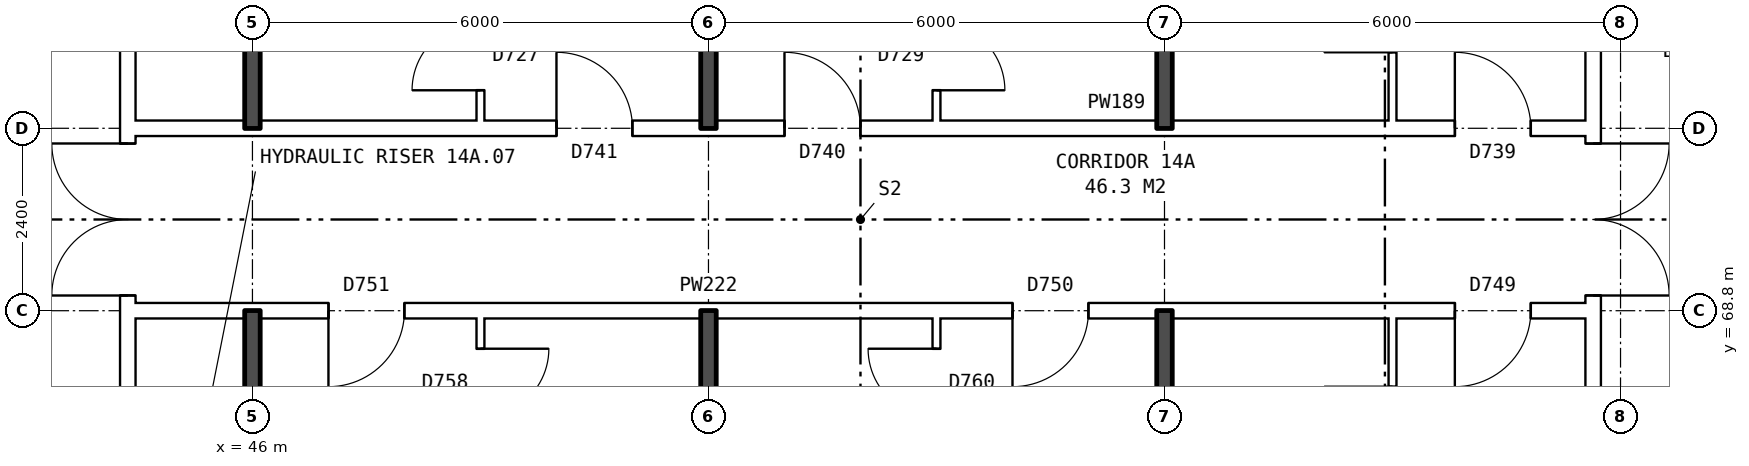
"""IFC4 building model, lengths in metres.
Left out: names, types, materials, properties, quantities, classifications, styles, units other than length and angle.
Written with IfcOpenShell. Run it as: python <this file> out.ifc"""

import sys

from ifc_helpers import new_model, si_unit, direction, frame, frame_2d, origin, place, context, subcontext, project, spatial, rectangle, extrude, element, fill, save


model = new_model("IFC4")
c1 = context("Model", 3, precision=1e-05, world=origin(), true_north=direction((0.0, 1.0)))
c2 = subcontext(c1, "Body", "Model", "MODEL_VIEW")
j1 = project(units=[si_unit("LENGTHUNIT", "METRE"), si_unit("PLANEANGLEUNIT", "RADIAN")], contexts=[c1])
p1 = place(None, origin())
s1 = spatial("IfcSite", under=j1, at=p1, CompositionType="ELEMENT")
p2 = place(p1, origin())
s2 = spatial("IfcBuilding", under=s1, at=p2, CompositionType="ELEMENT")
p3 = place(p2, frame((0.0, 0.0, 53.6)))
s3 = spatial("IfcBuildingStorey", under=s2, at=p3, CompositionType="ELEMENT", Elevation=53.6)
p4 = place(p3, frame((63.64, 63.9, 0.0), z_axis=(0.0, 0.0, 1.0), x_axis=(0.0, 1.0, 0.0)))
e1 = element("IfcWall", 1, at=p4, inside=s3, PredefinedType="PARTITIONING", context=c2, shape_type="SweptSolid", body=[
    extrude(rectangle(XDim=12.2, YDim=0.2, at=frame_2d((6.1, 0.0))), origin(), (0.0, 0.0, 1.0), 2.85),
])
p5 = place(p4, frame((5.1, 0.0, 0.0)))
e2 = element("IfcOpeningElement", 2, at=p5, cuts=e1, PredefinedType="OPENING", context=c2, shape_type="SweptSolid", body=[
    extrude(rectangle(XDim=2.0, YDim=2.1, at=frame_2d((1.0, 1.05))), frame((0.0, 0.11, 0.0), z_axis=(0.0, -1.0, 0.0), x_axis=(1.0, 0.0, 0.0)), (0.0, 0.0, 1.0), 0.22),
])
p6 = place(p3, frame((44.36, 63.9, 0.0), z_axis=(0.0, 0.0, 1.0), x_axis=(0.0, 1.0, 0.0)))
e3 = element("IfcWall", 3, at=p6, inside=s3, PredefinedType="PARTITIONING", context=c2, shape_type="SweptSolid", body=[
    extrude(rectangle(XDim=12.2, YDim=0.2, at=frame_2d((6.1, 0.0))), origin(), (0.0, 0.0, 1.0), 2.85),
])
p7 = place(p6, frame((5.1, 0.0, 0.0)))
e4 = element("IfcOpeningElement", 4, at=p7, cuts=e3, PredefinedType="OPENING", context=c2, shape_type="SweptSolid", body=[
    extrude(rectangle(XDim=2.0, YDim=2.1, at=frame_2d((1.0, 1.05))), frame((0.0, 0.11, 0.0), z_axis=(0.0, -1.0, 0.0), x_axis=(1.0, 0.0, 0.0)), (0.0, 0.0, 1.0), 0.22),
])
p8 = place(p3, frame((44.36, 68.8, 0.0), z_axis=(0.0, 0.0, 1.0), x_axis=(1.0, 0.0, 0.0)))
e5 = element("IfcWall", 5, at=p8, inside=s3, PredefinedType="PARTITIONING", context=c2, shape_type="SweptSolid", body=[
    extrude(rectangle(XDim=19.28, YDim=0.2, at=frame_2d((9.64, 0.0))), origin(), (0.0, 0.0, 1.0), 2.85),
])
p9 = place(p8, frame((17.46, 0.0, 0.0)))
e6 = element("IfcOpeningElement", 6, at=p9, cuts=e5, PredefinedType="OPENING", context=c2, shape_type="SweptSolid", body=[
    extrude(rectangle(XDim=1.0, YDim=2.1, at=frame_2d((0.5, 1.05))), frame((0.0, 0.11, 0.0), z_axis=(0.0, -1.0, 0.0), x_axis=(1.0, 0.0, 0.0)), (0.0, 0.0, 1.0), 0.22),
])
p10 = place(p8, frame((11.64, 0.0, 0.0)))
e7 = element("IfcOpeningElement", 7, at=p10, cuts=e5, PredefinedType="OPENING", context=c2, shape_type="SweptSolid", body=[
    extrude(rectangle(XDim=1.0, YDim=2.1, at=frame_2d((0.5, 1.05))), frame((0.0, 0.11, 0.0), z_axis=(0.0, -1.0, 0.0), x_axis=(1.0, 0.0, 0.0)), (0.0, 0.0, 1.0), 0.22),
])
p11 = place(p8, frame((2.64, 0.0, 0.0)))
e8 = element("IfcOpeningElement", 8, at=p11, cuts=e5, PredefinedType="OPENING", context=c2, shape_type="SweptSolid", body=[
    extrude(rectangle(XDim=1.0, YDim=2.1, at=frame_2d((0.5, 1.05))), frame((0.0, 0.11, 0.0), z_axis=(0.0, -1.0, 0.0), x_axis=(1.0, 0.0, 0.0)), (0.0, 0.0, 1.0), 0.22),
])
p12 = place(p3, frame((44.36, 71.2, 0.0), z_axis=(0.0, 0.0, 1.0), x_axis=(1.0, 0.0, 0.0)))
e9 = element("IfcWall", 9, at=p12, inside=s3, PredefinedType="PARTITIONING", context=c2, shape_type="SweptSolid", body=[
    extrude(rectangle(XDim=19.28, YDim=0.2, at=frame_2d((9.64, 0.0))), origin(), (0.0, 0.0, 1.0), 2.85),
])
p13 = place(p12, frame((17.46, 0.0, 0.0)))
e10 = element("IfcOpeningElement", 10, at=p13, cuts=e9, PredefinedType="OPENING", context=c2, shape_type="SweptSolid", body=[
    extrude(rectangle(XDim=1.0, YDim=2.1, at=frame_2d((0.5, 1.05))), frame((0.0, 0.11, 0.0), z_axis=(0.0, -1.0, 0.0), x_axis=(1.0, 0.0, 0.0)), (0.0, 0.0, 1.0), 0.22),
])
p14 = place(p12, frame((8.64, 0.0, 0.0)))
e11 = element("IfcOpeningElement", 11, at=p14, cuts=e9, PredefinedType="OPENING", context=c2, shape_type="SweptSolid", body=[
    extrude(rectangle(XDim=1.0, YDim=2.1, at=frame_2d((0.5, 1.05))), frame((0.0, 0.11, 0.0), z_axis=(0.0, -1.0, 0.0), x_axis=(1.0, 0.0, 0.0)), (0.0, 0.0, 1.0), 0.22),
])
p15 = place(p12, frame((5.64, 0.0, 0.0)))
e12 = element("IfcOpeningElement", 12, at=p15, cuts=e9, PredefinedType="OPENING", context=c2, shape_type="SweptSolid", body=[
    extrude(rectangle(XDim=1.0, YDim=2.1, at=frame_2d((0.5, 1.05))), frame((0.0, 0.11, 0.0), z_axis=(0.0, -1.0, 0.0), x_axis=(1.0, 0.0, 0.0)), (0.0, 0.0, 1.0), 0.22),
])
for number, where, z_axis, x_axis in (
    (13, (46.0, 63.8, 0.0), (0.0, 0.0, 1.0), (0.0, 1.0, 0.0)),
    (14, (46.0, 71.2, 0.0), (0.0, 0.0, 1.0), (0.0, 1.0, 0.0)),
):
    element("IfcWall", number, at=place(p3, frame(where, z_axis=z_axis, x_axis=x_axis)), inside=s3, PredefinedType="SOLIDWALL", context=c2, shape_type="SweptSolid", body=[
        extrude(rectangle(XDim=5.0, YDim=0.2, at=frame_2d((2.5, 0.0))), origin(), (0.0, 0.0, 1.0), 2.85),
    ])
p16 = place(p3, frame((49.0, 54.36, 0.0), z_axis=(0.0, 0.0, 1.0), x_axis=(0.0, 1.0, 0.0)))
e15 = element("IfcWall", 15, at=p16, inside=s3, PredefinedType="PARTITIONING", context=c2, shape_type="SweptSolid", body=[
    extrude(rectangle(XDim=14.34, YDim=0.1, at=frame_2d((7.17, 0.0))), origin(), (0.0, 0.0, 1.0), 2.85),
])
p17 = place(p16, frame((5.5, 0.0, 0.0)))
e16 = element("IfcOpeningElement", 16, at=p17, cuts=e15, PredefinedType="OPENING", context=c2, shape_type="SweptSolid", body=[
    extrude(rectangle(XDim=0.9, YDim=2.1, at=frame_2d((0.45, 1.05))), frame((0.0, 0.06, 0.0), z_axis=(0.0, -1.0, 0.0), x_axis=(1.0, 0.0, 0.0)), (0.0, 0.0, 1.0), 0.12),
])
p18 = place(p16, frame((13.04, 0.0, 0.0)))
e17 = element("IfcOpeningElement", 17, at=p18, cuts=e15, PredefinedType="OPENING", context=c2, shape_type="SweptSolid", body=[
    extrude(rectangle(XDim=0.9, YDim=2.1, at=frame_2d((0.45, 1.05))), frame((0.0, 0.06, 0.0), z_axis=(0.0, -1.0, 0.0), x_axis=(1.0, 0.0, 0.0)), (0.0, 0.0, 1.0), 0.12),
])
p19 = place(p3, frame((49.0, 71.3, 0.0), z_axis=(0.0, 0.0, 1.0), x_axis=(0.0, 1.0, 0.0)))
e18 = element("IfcWall", 18, at=p19, inside=s3, PredefinedType="PARTITIONING", context=c2, shape_type="SweptSolid", body=[
    extrude(rectangle(XDim=14.34, YDim=0.1, at=frame_2d((7.17, 0.0))), origin(), (0.0, 0.0, 1.0), 2.85),
])
p20 = place(p19, frame((6.74, 0.0, 0.0)))
e19 = element("IfcOpeningElement", 19, at=p20, cuts=e18, PredefinedType="OPENING", context=c2, shape_type="SweptSolid", body=[
    extrude(rectangle(XDim=0.9, YDim=2.1, at=frame_2d((0.45, 1.05))), frame((0.0, 0.06, 0.0), z_axis=(0.0, -1.0, 0.0), x_axis=(1.0, 0.0, 0.0)), (0.0, 0.0, 1.0), 0.12),
])
p21 = place(p19, frame((0.4, 0.0, 0.0)))
e20 = element("IfcOpeningElement", 20, at=p21, cuts=e18, PredefinedType="OPENING", context=c2, shape_type="SweptSolid", body=[
    extrude(rectangle(XDim=0.9, YDim=2.1, at=frame_2d((0.45, 1.05))), frame((0.0, 0.06, 0.0), z_axis=(0.0, -1.0, 0.0), x_axis=(1.0, 0.0, 0.0)), (0.0, 0.0, 1.0), 0.12),
])
for number, where, z_axis, x_axis in (
    (21, (52.0, 54.36, 0.0), (0.0, 0.0, 1.0), (0.0, 1.0, 0.0)),
    (22, (52.0, 71.2, 0.0), (0.0, 0.0, 1.0), (0.0, 1.0, 0.0)),
):
    element("IfcWall", number, at=place(p3, frame(where, z_axis=z_axis, x_axis=x_axis)), inside=s3, PredefinedType="SOLIDWALL", context=c2, shape_type="SweptSolid", body=[
        extrude(rectangle(XDim=14.44, YDim=0.2, at=frame_2d((7.22, 0.0))), origin(), (0.0, 0.0, 1.0), 2.85),
    ])
p22 = place(p3, frame((55.0, 54.36, 0.0), z_axis=(0.0, 0.0, 1.0), x_axis=(0.0, 1.0, 0.0)))
e23 = element("IfcWall", 23, at=p22, inside=s3, PredefinedType="PARTITIONING", context=c2, shape_type="SweptSolid", body=[
    extrude(rectangle(XDim=14.34, YDim=0.1, at=frame_2d((7.17, 0.0))), origin(), (0.0, 0.0, 1.0), 2.85),
])
p23 = place(p22, frame((7.7, 0.0, 0.0)))
e24 = element("IfcOpeningElement", 24, at=p23, cuts=e23, PredefinedType="OPENING", context=c2, shape_type="SweptSolid", body=[
    extrude(rectangle(XDim=0.9, YDim=2.1, at=frame_2d((0.45, 1.05))), frame((0.0, 0.06, 0.0), z_axis=(0.0, -1.0, 0.0), x_axis=(1.0, 0.0, 0.0)), (0.0, 0.0, 1.0), 0.12),
])
p24 = place(p22, frame((13.04, 0.0, 0.0)))
e25 = element("IfcOpeningElement", 25, at=p24, cuts=e23, PredefinedType="OPENING", context=c2, shape_type="SweptSolid", body=[
    extrude(rectangle(XDim=0.9, YDim=2.1, at=frame_2d((0.45, 1.05))), frame((0.0, 0.06, 0.0), z_axis=(0.0, -1.0, 0.0), x_axis=(1.0, 0.0, 0.0)), (0.0, 0.0, 1.0), 0.12),
])
p25 = place(p3, frame((55.0, 71.3, 0.0), z_axis=(0.0, 0.0, 1.0), x_axis=(0.0, 1.0, 0.0)))
e26 = element("IfcWall", 26, at=p25, inside=s3, PredefinedType="PARTITIONING", context=c2, shape_type="SweptSolid", body=[
    extrude(rectangle(XDim=14.34, YDim=0.1, at=frame_2d((7.17, 0.0))), origin(), (0.0, 0.0, 1.0), 2.85),
])
p26 = place(p25, frame((7.94, 0.0, 0.0)))
e27 = element("IfcOpeningElement", 27, at=p26, cuts=e26, PredefinedType="OPENING", context=c2, shape_type="SweptSolid", body=[
    extrude(rectangle(XDim=0.9, YDim=2.1, at=frame_2d((0.45, 1.05))), frame((0.0, 0.06, 0.0), z_axis=(0.0, -1.0, 0.0), x_axis=(1.0, 0.0, 0.0)), (0.0, 0.0, 1.0), 0.12),
])
p27 = place(p25, frame((0.4, 0.0, 0.0)))
e28 = element("IfcOpeningElement", 28, at=p27, cuts=e26, PredefinedType="OPENING", context=c2, shape_type="SweptSolid", body=[
    extrude(rectangle(XDim=0.9, YDim=2.1, at=frame_2d((0.45, 1.05))), frame((0.0, 0.06, 0.0), z_axis=(0.0, -1.0, 0.0), x_axis=(1.0, 0.0, 0.0)), (0.0, 0.0, 1.0), 0.12),
])
for number, where, z_axis, x_axis in (
    (29, (58.0, 54.36, 0.0), (0.0, 0.0, 1.0), (0.0, 1.0, 0.0)),
    (30, (58.0, 71.2, 0.0), (0.0, 0.0, 1.0), (0.0, 1.0, 0.0)),
):
    element("IfcWall", number, at=place(p3, frame(where, z_axis=z_axis, x_axis=x_axis)), inside=s3, PredefinedType="SOLIDWALL", context=c2, shape_type="SweptSolid", body=[
        extrude(rectangle(XDim=14.44, YDim=0.2, at=frame_2d((7.22, 0.0))), origin(), (0.0, 0.0, 1.0), 2.85),
    ])
p28 = place(p3, frame((61.0, 54.36, 0.0), z_axis=(0.0, 0.0, 1.0), x_axis=(0.0, 1.0, 0.0)))
e31 = element("IfcWall", 31, at=p28, inside=s3, PredefinedType="PARTITIONING", context=c2, shape_type="SweptSolid", body=[
    extrude(rectangle(XDim=14.34, YDim=0.1, at=frame_2d((7.17, 0.0))), origin(), (0.0, 0.0, 1.0), 2.85),
])
p29 = place(p28, frame((5.5, 0.0, 0.0)))
e32 = element("IfcOpeningElement", 32, at=p29, cuts=e31, PredefinedType="OPENING", context=c2, shape_type="SweptSolid", body=[
    extrude(rectangle(XDim=0.9, YDim=2.1, at=frame_2d((0.45, 1.05))), frame((0.0, 0.06, 0.0), z_axis=(0.0, -1.0, 0.0), x_axis=(1.0, 0.0, 0.0)), (0.0, 0.0, 1.0), 0.12),
])
p30 = place(p28, frame((12.54, 0.0, 0.0)))
e33 = element("IfcOpeningElement", 33, at=p30, cuts=e31, PredefinedType="OPENING", context=c2, shape_type="SweptSolid", body=[
    extrude(rectangle(XDim=0.9, YDim=2.1, at=frame_2d((0.45, 1.05))), frame((0.0, 0.06, 0.0), z_axis=(0.0, -1.0, 0.0), x_axis=(1.0, 0.0, 0.0)), (0.0, 0.0, 1.0), 0.12),
])
p31 = place(p3, frame((61.0, 71.3, 0.0), z_axis=(0.0, 0.0, 1.0), x_axis=(0.0, 1.0, 0.0)))
e34 = element("IfcWall", 34, at=p31, inside=s3, PredefinedType="PARTITIONING", context=c2, shape_type="SweptSolid", body=[
    extrude(rectangle(XDim=14.34, YDim=0.1, at=frame_2d((7.17, 0.0))), origin(), (0.0, 0.0, 1.0), 2.85),
])
p32 = place(p31, frame((9.24, 0.0, 0.0)))
e35 = element("IfcOpeningElement", 35, at=p32, cuts=e34, PredefinedType="OPENING", context=c2, shape_type="SweptSolid", body=[
    extrude(rectangle(XDim=0.9, YDim=2.1, at=frame_2d((0.45, 1.05))), frame((0.0, 0.06, 0.0), z_axis=(0.0, -1.0, 0.0), x_axis=(1.0, 0.0, 0.0)), (0.0, 0.0, 1.0), 0.12),
])
p33 = place(p31, frame((0.9, 0.0, 0.0)))
e36 = element("IfcOpeningElement", 36, at=p33, cuts=e34, PredefinedType="OPENING", context=c2, shape_type="SweptSolid", body=[
    extrude(rectangle(XDim=0.9, YDim=2.1, at=frame_2d((0.45, 1.05))), frame((0.0, 0.06, 0.0), z_axis=(0.0, -1.0, 0.0), x_axis=(1.0, 0.0, 0.0)), (0.0, 0.0, 1.0), 0.12),
])
p34 = place(p5, frame((2.0, 0.0, 0.0), z_axis=(0.0, 0.0, 1.0), x_axis=(-1.0, 0.0, 0.0)))
e37 = element("IfcDoor", 37, at=p34, inside=s3, OperationType="DOUBLE_DOOR_SINGLE_SWING", PredefinedType="DOOR", context=c2, shape_type="SweptSolid", body=[
    extrude(rectangle(XDim=2.0, YDim=2.1, at=frame_2d((1.0, 1.05))), frame((0.0, 0.025, 0.0), z_axis=(0.0, -1.0, 0.0), x_axis=(1.0, 0.0, 0.0)), (0.0, 0.0, 1.0), 0.05),
])
fill(e2, e37)
p35 = place(p7, origin())
e38 = element("IfcDoor", 38, at=p35, inside=s3, OperationType="DOUBLE_DOOR_SINGLE_SWING", PredefinedType="DOOR", context=c2, shape_type="SweptSolid", body=[
    extrude(rectangle(XDim=2.0, YDim=2.1, at=frame_2d((1.0, 1.05))), frame((0.0, 0.025, 0.0), z_axis=(0.0, -1.0, 0.0), x_axis=(1.0, 0.0, 0.0)), (0.0, 0.0, 1.0), 0.05),
])
fill(e4, e38)
p36 = place(p9, frame((1.0, 0.0, 0.0), z_axis=(0.0, 0.0, 1.0), x_axis=(-1.0, 0.0, 0.0)))
e39 = element("IfcDoor", 39, at=p36, inside=s3, OperationType="SINGLE_SWING_RIGHT", PredefinedType="DOOR", context=c2, shape_type="SweptSolid", body=[
    extrude(rectangle(XDim=1.0, YDim=2.1, at=frame_2d((0.5, 1.05))), frame((0.0, 0.025, 0.0), z_axis=(0.0, -1.0, 0.0), x_axis=(1.0, 0.0, 0.0)), (0.0, 0.0, 1.0), 0.05),
])
fill(e6, e39)
p37 = place(p10, frame((1.0, 0.0, 0.0), z_axis=(0.0, 0.0, 1.0), x_axis=(-1.0, 0.0, 0.0)))
e40 = element("IfcDoor", 40, at=p37, inside=s3, OperationType="SINGLE_SWING_RIGHT", PredefinedType="DOOR", context=c2, shape_type="SweptSolid", body=[
    extrude(rectangle(XDim=1.0, YDim=2.1, at=frame_2d((0.5, 1.05))), frame((0.0, 0.025, 0.0), z_axis=(0.0, -1.0, 0.0), x_axis=(1.0, 0.0, 0.0)), (0.0, 0.0, 1.0), 0.05),
])
fill(e7, e40)
p38 = place(p24, origin())
e41 = element("IfcDoor", 41, at=p38, inside=s3, OperationType="SINGLE_SWING_RIGHT", PredefinedType="DOOR", context=c2, shape_type="SweptSolid", body=[
    extrude(rectangle(XDim=0.9, YDim=2.1, at=frame_2d((0.45, 1.05))), frame((0.0, 0.025, 0.0), z_axis=(0.0, -1.0, 0.0), x_axis=(1.0, 0.0, 0.0)), (0.0, 0.0, 1.0), 0.05),
])
fill(e25, e41)
p39 = place(p11, frame((1.0, 0.0, 0.0), z_axis=(0.0, 0.0, 1.0), x_axis=(-1.0, 0.0, 0.0)))
e42 = element("IfcDoor", 42, at=p39, inside=s3, OperationType="SINGLE_SWING_RIGHT", PredefinedType="DOOR", context=c2, shape_type="SweptSolid", body=[
    extrude(rectangle(XDim=1.0, YDim=2.1, at=frame_2d((0.5, 1.05))), frame((0.0, 0.025, 0.0), z_axis=(0.0, -1.0, 0.0), x_axis=(1.0, 0.0, 0.0)), (0.0, 0.0, 1.0), 0.05),
])
fill(e8, e42)
p40 = place(p18, frame((0.9, 0.0, 0.0), z_axis=(0.0, 0.0, 1.0), x_axis=(-1.0, 0.0, 0.0)))
e43 = element("IfcDoor", 43, at=p40, inside=s3, OperationType="SINGLE_SWING_LEFT", PredefinedType="DOOR", context=c2, shape_type="SweptSolid", body=[
    extrude(rectangle(XDim=0.9, YDim=2.1, at=frame_2d((0.45, 1.05))), frame((0.0, 0.025, 0.0), z_axis=(0.0, -1.0, 0.0), x_axis=(1.0, 0.0, 0.0)), (0.0, 0.0, 1.0), 0.05),
])
fill(e17, e43)
p41 = place(p13, origin())
e44 = element("IfcDoor", 44, at=p41, inside=s3, OperationType="SINGLE_SWING_LEFT", PredefinedType="DOOR", context=c2, shape_type="SweptSolid", body=[
    extrude(rectangle(XDim=1.0, YDim=2.1, at=frame_2d((0.5, 1.05))), frame((0.0, 0.025, 0.0), z_axis=(0.0, -1.0, 0.0), x_axis=(1.0, 0.0, 0.0)), (0.0, 0.0, 1.0), 0.05),
])
fill(e10, e44)
p42 = place(p14, origin())
e45 = element("IfcDoor", 45, at=p42, inside=s3, OperationType="SINGLE_SWING_LEFT", PredefinedType="DOOR", context=c2, shape_type="SweptSolid", body=[
    extrude(rectangle(XDim=1.0, YDim=2.1, at=frame_2d((0.5, 1.05))), frame((0.0, 0.025, 0.0), z_axis=(0.0, -1.0, 0.0), x_axis=(1.0, 0.0, 0.0)), (0.0, 0.0, 1.0), 0.05),
])
fill(e11, e45)
p43 = place(p27, frame((0.9, 0.0, 0.0), z_axis=(0.0, 0.0, 1.0), x_axis=(-1.0, 0.0, 0.0)))
e46 = element("IfcDoor", 46, at=p43, inside=s3, OperationType="SINGLE_SWING_RIGHT", PredefinedType="DOOR", context=c2, shape_type="SweptSolid", body=[
    extrude(rectangle(XDim=0.9, YDim=2.1, at=frame_2d((0.45, 1.05))), frame((0.0, 0.025, 0.0), z_axis=(0.0, -1.0, 0.0), x_axis=(1.0, 0.0, 0.0)), (0.0, 0.0, 1.0), 0.05),
])
fill(e28, e46)
p44 = place(p15, origin())
e47 = element("IfcDoor", 47, at=p44, inside=s3, OperationType="SINGLE_SWING_LEFT", PredefinedType="DOOR", context=c2, shape_type="SweptSolid", body=[
    extrude(rectangle(XDim=1.0, YDim=2.1, at=frame_2d((0.5, 1.05))), frame((0.0, 0.025, 0.0), z_axis=(0.0, -1.0, 0.0), x_axis=(1.0, 0.0, 0.0)), (0.0, 0.0, 1.0), 0.05),
])
fill(e12, e47)
p45 = place(p21, origin())
e48 = element("IfcDoor", 48, at=p45, inside=s3, OperationType="SINGLE_SWING_LEFT", PredefinedType="DOOR", context=c2, shape_type="SweptSolid", body=[
    extrude(rectangle(XDim=0.9, YDim=2.1, at=frame_2d((0.45, 1.05))), frame((0.0, 0.025, 0.0), z_axis=(0.0, -1.0, 0.0), x_axis=(1.0, 0.0, 0.0)), (0.0, 0.0, 1.0), 0.05),
])
fill(e20, e48)
save(model, sys.argv[1])
